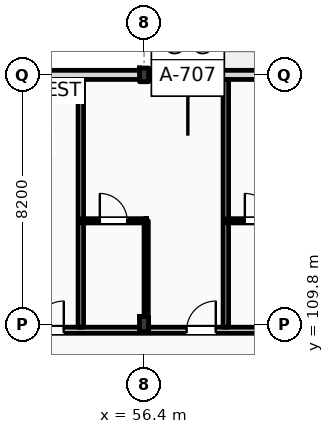
"""IFC4 building model, lengths in metres.
Left out: names, types, materials, properties, quantities, classifications, styles, units other than length and angle.
Written with IfcOpenShell. Run it as: python <this file> out.ifc"""

import sys

from ifc_helpers import new_model, si_unit, direction, frame, frame_2d, origin, origin_2d, place, context, subcontext, project, spatial, rectangle, i_section, extrude, element, fill, save


model = new_model("IFC4")
c1 = context("Model", 3, precision=1e-05, world=origin(), true_north=direction((0.0, 1.0)))
c2 = subcontext(c1, "Body", "Model", "MODEL_VIEW")
j1 = project(units=[si_unit("LENGTHUNIT", "METRE"), si_unit("PLANEANGLEUNIT", "RADIAN")], contexts=[c1])
p1 = place(None, origin())
s1 = spatial("IfcSite", under=j1, at=p1, CompositionType="ELEMENT")
p2 = place(p1, origin())
s2 = spatial("IfcBuilding", under=s1, at=p2, CompositionType="ELEMENT")
p3 = place(p2, frame((0.0, 0.0, 35.4)))
s3 = spatial("IfcBuildingStorey", under=s2, at=p3, CompositionType="ELEMENT", Elevation=35.4)
p4 = place(p3, frame((56.4, 109.8, 0.0), z_axis=(0.0, 0.0, 1.0), x_axis=(1.0, 0.0, 0.0)))
e1 = element("IfcColumn", 1, at=p4, inside=s3, PredefinedType="COLUMN", context=c2, shape_type="SweptSolid", body=[
    extrude(i_section(OverallWidth=0.3, OverallDepth=0.5, WebThickness=0.014, FlangeThickness=0.028, FilletRadius=0.027, at=origin_2d()), origin(), (0.0, 0.0, 1.0), 3.6),
])
p5 = place(p3, frame((56.4, 118.0, 0.0), z_axis=(0.0, 0.0, 1.0), x_axis=(1.0, 0.0, 0.0)))
e2 = element("IfcColumn", 2, at=p5, inside=s3, PredefinedType="COLUMN", context=c2, shape_type="SweptSolid", body=[
    extrude(i_section(OverallWidth=0.3, OverallDepth=0.45, WebThickness=0.014, FlangeThickness=0.026, FilletRadius=0.027, at=origin_2d()), origin(), (0.0, 0.0, 1.0), 3.6),
])
p6 = place(p3, frame((22.5, 118.0, 0.0), z_axis=(0.0, 0.0, 1.0), x_axis=(1.0, 0.0, 0.0)))
e3 = element("IfcWall", 3, at=p6, inside=s3, PredefinedType="STANDARD", context=c2, shape_type="SweptSolid", body=[
    extrude(rectangle(XDim=72.9, YDim=0.3, at=frame_2d((36.45, 0.0))), origin(), (0.0, 0.0, 1.0), 2.92),
])
p7 = place(p6, frame((0.91, 0.0, 0.9)))
e4 = element("IfcOpeningElement", 4, at=p7, cuts=e3, PredefinedType="OPENING", context=c2, shape_type="SweptSolid", body=[
    extrude(rectangle(XDim=0.9, YDim=1.84, at=frame_2d((0.45, 0.92))), frame((0.0, 0.16, 0.0), z_axis=(0.0, -1.0, 0.0), x_axis=(1.0, 0.0, 0.0)), (0.0, 0.0, 1.0), 0.32),
])
p8 = place(p6, frame((6.665, 0.0, 0.0)))
e5 = element("IfcOpeningElement", 5, at=p8, cuts=e3, PredefinedType="OPENING", context=c2, shape_type="SweptSolid", body=[
    extrude(rectangle(XDim=1.2, YDim=2.25, at=frame_2d((0.6, 1.125))), frame((0.0, 0.16, 0.0), z_axis=(0.0, -1.0, 0.0), x_axis=(1.0, 0.0, 0.0)), (0.0, 0.0, 1.0), 0.32),
])
p9 = place(p6, frame((11.355, 0.0, 0.9)))
e6 = element("IfcOpeningElement", 6, at=p9, cuts=e3, PredefinedType="OPENING", context=c2, shape_type="SweptSolid", body=[
    extrude(rectangle(XDim=1.1, YDim=1.5, at=frame_2d((0.55, 0.75))), frame((0.0, 0.16, 0.0), z_axis=(0.0, -1.0, 0.0), x_axis=(1.0, 0.0, 0.0)), (0.0, 0.0, 1.0), 0.32),
])
p10 = place(p6, frame((15.58, 0.0, 0.9)))
e7 = element("IfcOpeningElement", 7, at=p10, cuts=e3, PredefinedType="OPENING", context=c2, shape_type="SweptSolid", body=[
    extrude(rectangle(XDim=1.25, YDim=1.6, at=frame_2d((0.625, 0.8))), frame((0.0, 0.16, 0.0), z_axis=(0.0, -1.0, 0.0), x_axis=(1.0, 0.0, 0.0)), (0.0, 0.0, 1.0), 0.32),
])
p11 = place(p6, frame((21.08, 0.0, 0.0)))
e8 = element("IfcOpeningElement", 8, at=p11, cuts=e3, PredefinedType="OPENING", context=c2, shape_type="SweptSolid", body=[
    extrude(rectangle(XDim=1.2, YDim=2.25, at=frame_2d((0.6, 1.125))), frame((0.0, 0.16, 0.0), z_axis=(0.0, -1.0, 0.0), x_axis=(1.0, 0.0, 0.0)), (0.0, 0.0, 1.0), 0.32),
])
p12 = place(p6, frame((23.54, 0.0, 0.0)))
e9 = element("IfcOpeningElement", 9, at=p12, cuts=e3, PredefinedType="OPENING", context=c2, shape_type="SweptSolid", body=[
    extrude(rectangle(XDim=1.2, YDim=2.25, at=frame_2d((0.6, 1.125))), frame((0.0, 0.16, 0.0), z_axis=(0.0, -1.0, 0.0), x_axis=(1.0, 0.0, 0.0)), (0.0, 0.0, 1.0), 0.32),
])
p13 = place(p6, frame((28.83, 0.0, 0.9)))
e10 = element("IfcOpeningElement", 10, at=p13, cuts=e3, PredefinedType="OPENING", context=c2, shape_type="SweptSolid", body=[
    extrude(rectangle(XDim=1.75, YDim=1.84, at=frame_2d((0.875, 0.92))), frame((0.0, 0.16, 0.0), z_axis=(0.0, -1.0, 0.0), x_axis=(1.0, 0.0, 0.0)), (0.0, 0.0, 1.0), 0.32),
])
p14 = place(p6, frame((34.805, 0.0, 0.9)))
e11 = element("IfcOpeningElement", 11, at=p14, cuts=e3, PredefinedType="OPENING", context=c2, shape_type="SweptSolid", body=[
    extrude(rectangle(XDim=1.35, YDim=1.84, at=frame_2d((0.675, 0.92))), frame((0.0, 0.16, 0.0), z_axis=(0.0, -1.0, 0.0), x_axis=(1.0, 0.0, 0.0)), (0.0, 0.0, 1.0), 0.32),
])
p15 = place(p6, frame((38.105, 0.0, 0.0)))
e12 = element("IfcOpeningElement", 12, at=p15, cuts=e3, PredefinedType="OPENING", context=c2, shape_type="SweptSolid", body=[
    extrude(rectangle(XDim=1.2, YDim=2.25, at=frame_2d((0.6, 1.125))), frame((0.0, 0.16, 0.0), z_axis=(0.0, -1.0, 0.0), x_axis=(1.0, 0.0, 0.0)), (0.0, 0.0, 1.0), 0.32),
])
p16 = place(p6, frame((42.505, 0.0, 0.9)))
e13 = element("IfcOpeningElement", 13, at=p16, cuts=e3, PredefinedType="OPENING", context=c2, shape_type="SweptSolid", body=[
    extrude(rectangle(XDim=2.6, YDim=1.84, at=frame_2d((1.3, 0.92))), frame((0.0, 0.16, 0.0), z_axis=(0.0, -1.0, 0.0), x_axis=(1.0, 0.0, 0.0)), (0.0, 0.0, 1.0), 0.32),
])
p17 = place(p6, frame((46.2, 0.0, 0.9)))
e14 = element("IfcOpeningElement", 14, at=p17, cuts=e3, PredefinedType="OPENING", context=c2, shape_type="SweptSolid", body=[
    extrude(rectangle(XDim=1.8, YDim=1.84, at=frame_2d((0.9, 0.92))), frame((0.0, 0.16, 0.0), z_axis=(0.0, -1.0, 0.0), x_axis=(1.0, 0.0, 0.0)), (0.0, 0.0, 1.0), 0.32),
])
p18 = place(p6, frame((52.565, 0.0, 0.0)))
e15 = element("IfcOpeningElement", 15, at=p18, cuts=e3, PredefinedType="OPENING", context=c2, shape_type="SweptSolid", body=[
    extrude(rectangle(XDim=1.2, YDim=2.25, at=frame_2d((0.6, 1.125))), frame((0.0, 0.16, 0.0), z_axis=(0.0, -1.0, 0.0), x_axis=(1.0, 0.0, 0.0)), (0.0, 0.0, 1.0), 0.32),
])
p19 = place(p6, frame((55.305, 0.0, 0.9)))
e16 = element("IfcOpeningElement", 16, at=p19, cuts=e3, PredefinedType="OPENING", context=c2, shape_type="SweptSolid", body=[
    extrude(rectangle(XDim=1.2, YDim=1.8, at=frame_2d((0.6, 0.9))), frame((0.0, 0.16, 0.0), z_axis=(0.0, -1.0, 0.0), x_axis=(1.0, 0.0, 0.0)), (0.0, 0.0, 1.0), 0.32),
])
p20 = place(p6, frame((60.53, 0.0, 0.9)))
e17 = element("IfcOpeningElement", 17, at=p20, cuts=e3, PredefinedType="OPENING", context=c2, shape_type="SweptSolid", body=[
    extrude(rectangle(XDim=1.35, YDim=1.84, at=frame_2d((0.675, 0.92))), frame((0.0, 0.16, 0.0), z_axis=(0.0, -1.0, 0.0), x_axis=(1.0, 0.0, 0.0)), (0.0, 0.0, 1.0), 0.32),
])
p21 = place(p6, frame((65.955, 0.0, 0.9)))
e18 = element("IfcOpeningElement", 18, at=p21, cuts=e3, PredefinedType="OPENING", context=c2, shape_type="SweptSolid", body=[
    extrude(rectangle(XDim=1.35, YDim=1.84, at=frame_2d((0.675, 0.92))), frame((0.0, 0.16, 0.0), z_axis=(0.0, -1.0, 0.0), x_axis=(1.0, 0.0, 0.0)), (0.0, 0.0, 1.0), 0.32),
])
p22 = place(p6, frame((69.335, 0.0, 0.9)))
e19 = element("IfcOpeningElement", 19, at=p22, cuts=e3, PredefinedType="OPENING", context=c2, shape_type="SweptSolid", body=[
    extrude(rectangle(XDim=1.65, YDim=1.84, at=frame_2d((0.825, 0.92))), frame((0.0, 0.16, 0.0), z_axis=(0.0, -1.0, 0.0), x_axis=(1.0, 0.0, 0.0)), (0.0, 0.0, 1.0), 0.32),
])
p23 = place(p3, frame((10.65, 109.6, 0.0), z_axis=(0.0, 0.0, 1.0), x_axis=(1.0, 0.0, 0.0)))
e20 = element("IfcWall", 20, at=p23, inside=s3, PredefinedType="PARTITIONING", context=c2, shape_type="SweptSolid", body=[
    extrude(rectangle(XDim=84.61, YDim=0.2, at=frame_2d((42.305, 0.0))), origin(), (0.0, 0.0, 1.0), 2.82),
])
p24 = place(p23, frame((12.675, 0.0, 0.0)))
e21 = element("IfcOpeningElement", 21, at=p24, cuts=e20, PredefinedType="OPENING", context=c2, shape_type="SweptSolid", body=[
    extrude(rectangle(XDim=1.02, YDim=2.2, at=frame_2d((0.51, 1.1))), frame((0.0, 0.11, 0.0), z_axis=(0.0, -1.0, 0.0), x_axis=(1.0, 0.0, 0.0)), (0.0, 0.0, 1.0), 0.22),
])
p25 = place(p23, frame((19.62, 0.0, 0.0)))
e22 = element("IfcOpeningElement", 22, at=p25, cuts=e20, PredefinedType="OPENING", context=c2, shape_type="SweptSolid", body=[
    extrude(rectangle(XDim=1.02, YDim=2.2, at=frame_2d((0.51, 1.1))), frame((0.0, 0.11, 0.0), z_axis=(0.0, -1.0, 0.0), x_axis=(1.0, 0.0, 0.0)), (0.0, 0.0, 1.0), 0.22),
])
p26 = place(p23, frame((24.12, 0.0, 0.0)))
e23 = element("IfcOpeningElement", 23, at=p26, cuts=e20, PredefinedType="OPENING", context=c2, shape_type="SweptSolid", body=[
    extrude(rectangle(XDim=1.02, YDim=2.2, at=frame_2d((0.51, 1.1))), frame((0.0, 0.11, 0.0), z_axis=(0.0, -1.0, 0.0), x_axis=(1.0, 0.0, 0.0)), (0.0, 0.0, 1.0), 0.22),
])
p27 = place(p23, frame((26.47, 0.0, 0.0)))
e24 = element("IfcOpeningElement", 24, at=p27, cuts=e20, PredefinedType="OPENING", context=c2, shape_type="SweptSolid", body=[
    extrude(rectangle(XDim=1.02, YDim=2.2, at=frame_2d((0.51, 1.1))), frame((0.0, 0.11, 0.0), z_axis=(0.0, -1.0, 0.0), x_axis=(1.0, 0.0, 0.0)), (0.0, 0.0, 1.0), 0.22),
])
p28 = place(p23, frame((33.15, 0.0, 0.0)))
e25 = element("IfcOpeningElement", 25, at=p28, cuts=e20, PredefinedType="OPENING", context=c2, shape_type="SweptSolid", body=[
    extrude(rectangle(XDim=0.96, YDim=2.2, at=frame_2d((0.48, 1.1))), frame((0.0, 0.11, 0.0), z_axis=(0.0, -1.0, 0.0), x_axis=(1.0, 0.0, 0.0)), (0.0, 0.0, 1.0), 0.22),
])
p29 = place(p23, frame((35.5, 0.0, 0.0)))
e26 = element("IfcOpeningElement", 26, at=p29, cuts=e20, PredefinedType="OPENING", context=c2, shape_type="SweptSolid", body=[
    extrude(rectangle(XDim=0.96, YDim=2.2, at=frame_2d((0.48, 1.1))), frame((0.0, 0.11, 0.0), z_axis=(0.0, -1.0, 0.0), x_axis=(1.0, 0.0, 0.0)), (0.0, 0.0, 1.0), 0.22),
])
p30 = place(p23, frame((42.15, 0.0, 0.0)))
e27 = element("IfcOpeningElement", 27, at=p30, cuts=e20, PredefinedType="OPENING", context=c2, shape_type="SweptSolid", body=[
    extrude(rectangle(XDim=0.96, YDim=2.2, at=frame_2d((0.48, 1.1))), frame((0.0, 0.11, 0.0), z_axis=(0.0, -1.0, 0.0), x_axis=(1.0, 0.0, 0.0)), (0.0, 0.0, 1.0), 0.22),
])
p31 = place(p23, frame((47.15, 0.0, 0.0)))
e28 = element("IfcOpeningElement", 28, at=p31, cuts=e20, PredefinedType="OPENING", context=c2, shape_type="SweptSolid", body=[
    extrude(rectangle(XDim=0.96, YDim=2.2, at=frame_2d((0.48, 1.1))), frame((0.0, 0.11, 0.0), z_axis=(0.0, -1.0, 0.0), x_axis=(1.0, 0.0, 0.0)), (0.0, 0.0, 1.0), 0.22),
])
p32 = place(p23, frame((51.15, 0.0, 0.0)))
e29 = element("IfcOpeningElement", 29, at=p32, cuts=e20, PredefinedType="OPENING", context=c2, shape_type="SweptSolid", body=[
    extrude(rectangle(XDim=0.96, YDim=2.2, at=frame_2d((0.48, 1.1))), frame((0.0, 0.11, 0.0), z_axis=(0.0, -1.0, 0.0), x_axis=(1.0, 0.0, 0.0)), (0.0, 0.0, 1.0), 0.22),
])
p33 = place(p23, frame((55.65, 0.0, 0.0)))
e30 = element("IfcOpeningElement", 30, at=p33, cuts=e20, PredefinedType="OPENING", context=c2, shape_type="SweptSolid", body=[
    extrude(rectangle(XDim=0.96, YDim=2.2, at=frame_2d((0.48, 1.1))), frame((0.0, 0.11, 0.0), z_axis=(0.0, -1.0, 0.0), x_axis=(1.0, 0.0, 0.0)), (0.0, 0.0, 1.0), 0.22),
])
p34 = place(p23, frame((58.0, 0.0, 0.0)))
e31 = element("IfcOpeningElement", 31, at=p34, cuts=e20, PredefinedType="OPENING", context=c2, shape_type="SweptSolid", body=[
    extrude(rectangle(XDim=0.96, YDim=2.2, at=frame_2d((0.48, 1.1))), frame((0.0, 0.11, 0.0), z_axis=(0.0, -1.0, 0.0), x_axis=(1.0, 0.0, 0.0)), (0.0, 0.0, 1.0), 0.22),
])
p35 = place(p23, frame((64.65, 0.0, 0.0)))
e32 = element("IfcOpeningElement", 32, at=p35, cuts=e20, PredefinedType="OPENING", context=c2, shape_type="SweptSolid", body=[
    extrude(rectangle(XDim=0.96, YDim=2.2, at=frame_2d((0.48, 1.1))), frame((0.0, 0.11, 0.0), z_axis=(0.0, -1.0, 0.0), x_axis=(1.0, 0.0, 0.0)), (0.0, 0.0, 1.0), 0.22),
])
p36 = place(p23, frame((66.75, 0.0, 0.0)))
e33 = element("IfcOpeningElement", 33, at=p36, cuts=e20, PredefinedType="OPENING", context=c2, shape_type="SweptSolid", body=[
    extrude(rectangle(XDim=0.96, YDim=2.2, at=frame_2d((0.48, 1.1))), frame((0.0, 0.11, 0.0), z_axis=(0.0, -1.0, 0.0), x_axis=(1.0, 0.0, 0.0)), (0.0, 0.0, 1.0), 0.22),
])
p37 = place(p23, frame((73.65, 0.0, 0.0)))
e34 = element("IfcOpeningElement", 34, at=p37, cuts=e20, PredefinedType="OPENING", context=c2, shape_type="SweptSolid", body=[
    extrude(rectangle(XDim=0.96, YDim=2.2, at=frame_2d((0.48, 1.1))), frame((0.0, 0.11, 0.0), z_axis=(0.0, -1.0, 0.0), x_axis=(1.0, 0.0, 0.0)), (0.0, 0.0, 1.0), 0.22),
])
p38 = place(p23, frame((78.4, 0.0, 0.0)))
e35 = element("IfcOpeningElement", 35, at=p38, cuts=e20, PredefinedType="OPENING", context=c2, shape_type="SweptSolid", body=[
    extrude(rectangle(XDim=0.96, YDim=2.2, at=frame_2d((0.48, 1.1))), frame((0.0, 0.11, 0.0), z_axis=(0.0, -1.0, 0.0), x_axis=(1.0, 0.0, 0.0)), (0.0, 0.0, 1.0), 0.22),
])
p39 = place(p23, frame((80.455, 0.0, 0.0)))
e36 = element("IfcOpeningElement", 36, at=p39, cuts=e20, PredefinedType="OPENING", context=c2, shape_type="SweptSolid", body=[
    extrude(rectangle(XDim=0.96, YDim=2.2, at=frame_2d((0.48, 1.1))), frame((0.0, 0.11, 0.0), z_axis=(0.0, -1.0, 0.0), x_axis=(1.0, 0.0, 0.0)), (0.0, 0.0, 1.0), 0.22),
])
p40 = place(p23, frame((2.716, 0.0, 0.0)))
e37 = element("IfcOpeningElement", 37, at=p40, cuts=e20, PredefinedType="OPENING", context=c2, shape_type="SweptSolid", body=[
    extrude(rectangle(XDim=1.35, YDim=2.25, at=frame_2d((0.675, 1.125))), frame((0.0, 0.11, 0.0), z_axis=(0.0, -1.0, 0.0), x_axis=(1.0, 0.0, 0.0)), (0.0, 0.0, 1.0), 0.22),
])
p41 = place(p23, frame((6.65, 0.0, 0.0)))
e38 = element("IfcOpeningElement", 38, at=p41, cuts=e20, PredefinedType="OPENING", context=c2, shape_type="SweptSolid", body=[
    extrude(rectangle(XDim=1.35, YDim=2.25, at=frame_2d((0.675, 1.125))), frame((0.0, 0.11, 0.0), z_axis=(0.0, -1.0, 0.0), x_axis=(1.0, 0.0, 0.0)), (0.0, 0.0, 1.0), 0.22),
])
p42 = place(p23, frame((10.583, 0.0, 0.0)))
e39 = element("IfcOpeningElement", 39, at=p42, cuts=e20, PredefinedType="OPENING", context=c2, shape_type="SweptSolid", body=[
    extrude(rectangle(XDim=1.35, YDim=2.25, at=frame_2d((0.675, 1.125))), frame((0.0, 0.11, 0.0), z_axis=(0.0, -1.0, 0.0), x_axis=(1.0, 0.0, 0.0)), (0.0, 0.0, 1.0), 0.22),
])
p43 = place(p3, frame((54.32, 109.7, 0.0), z_axis=(0.0, 0.0, 1.0), x_axis=(0.0, 1.0, 0.0)))
e40 = element("IfcWall", 40, at=p43, inside=s3, PredefinedType="PARTITIONING", context=c2, shape_type="SweptSolid", body=[
    extrude(rectangle(XDim=8.15, YDim=0.18, at=frame_2d((4.075, 0.0))), origin(), (0.0, 0.0, 1.0), 3.38),
])
p44 = place(p3, frame((59.09, 109.7, 0.0), z_axis=(0.0, 0.0, 1.0), x_axis=(0.0, 1.0, 0.0)))
e41 = element("IfcWall", 41, at=p44, inside=s3, PredefinedType="PARTITIONING", context=c2, shape_type="SweptSolid", body=[
    extrude(rectangle(XDim=8.15, YDim=0.18, at=frame_2d((4.075, 0.0))), origin(), (0.0, 0.0, 1.0), 3.07),
])
p45 = place(p3, frame((56.47, 109.7, 0.0), z_axis=(0.0, 0.0, 1.0), x_axis=(0.0, 1.0, 0.0)))
e42 = element("IfcWall", 42, at=p45, inside=s3, PredefinedType="PARTITIONING", context=c2, shape_type="SweptSolid", body=[
    extrude(rectangle(XDim=3.5, YDim=0.14, at=frame_2d((1.75, 0.0))), origin(), (0.0, 0.0, 1.0), 3.01),
])
p46 = place(p3, frame((54.32, 113.2, 0.0), z_axis=(0.0, 0.0, 1.0), x_axis=(1.0, 0.0, 0.0)))
e43 = element("IfcWall", 43, at=p46, inside=s3, PredefinedType="PARTITIONING", context=c2, shape_type="SweptSolid", body=[
    extrude(rectangle(XDim=2.15, YDim=0.14, at=frame_2d((1.075, 0.0))), origin(), (0.0, 0.0, 1.0), 3.38),
])
p47 = place(p46, frame((0.625, 0.0, 0.0)))
e44 = element("IfcOpeningElement", 44, at=p47, cuts=e43, PredefinedType="OPENING", context=c2, shape_type="SweptSolid", body=[
    extrude(rectangle(XDim=0.9, YDim=2.1, at=frame_2d((0.45, 1.05))), frame((0.0, 0.08, 0.0), z_axis=(0.0, -1.0, 0.0), x_axis=(1.0, 0.0, 0.0)), (0.0, 0.0, 1.0), 0.16),
])
p48 = place(p3, frame((59.09, 113.2, 0.0), z_axis=(0.0, 0.0, 1.0), x_axis=(1.0, 0.0, 0.0)))
e45 = element("IfcWall", 45, at=p48, inside=s3, PredefinedType="PARTITIONING", context=c2, shape_type="SweptSolid", body=[
    extrude(rectangle(XDim=2.15, YDim=0.14, at=frame_2d((1.075, 0.0))), origin(), (0.0, 0.0, 1.0), 3.38),
])
p49 = place(p48, frame((0.625, 0.0, 0.0)))
e46 = element("IfcOpeningElement", 46, at=p49, cuts=e45, PredefinedType="OPENING", context=c2, shape_type="SweptSolid", body=[
    extrude(rectangle(XDim=0.9, YDim=2.1, at=frame_2d((0.45, 1.05))), frame((0.0, 0.08, 0.0), z_axis=(0.0, -1.0, 0.0), x_axis=(1.0, 0.0, 0.0)), (0.0, 0.0, 1.0), 0.16),
])
p50 = place(p14, origin())
e47 = element("IfcWindow", 47, at=p50, inside=s3, PartitioningType="DOUBLE_PANEL_VERTICAL", PredefinedType="WINDOW", context=c2, shape_type="SweptSolid", body=[
    extrude(rectangle(XDim=1.35, YDim=1.84, at=frame_2d((0.675, 0.92))), frame((0.0, 0.03, 0.0), z_axis=(0.0, -1.0, 0.0), x_axis=(1.0, 0.0, 0.0)), (0.0, 0.0, 1.0), 0.06),
])
fill(e11, e47)
p51 = place(p30, origin())
e48 = element("IfcDoor", 48, at=p51, inside=s3, OperationType="SINGLE_SWING_RIGHT", PredefinedType="DOOR", context=c2, shape_type="SweptSolid", body=[
    extrude(rectangle(XDim=0.96, YDim=2.2, at=frame_2d((0.48, 1.1))), frame((0.0, 0.025, 0.0), z_axis=(0.0, -1.0, 0.0), x_axis=(1.0, 0.0, 0.0)), (0.0, 0.0, 1.0), 0.05),
])
fill(e27, e48)
p52 = place(p31, origin())
e49 = element("IfcDoor", 49, at=p52, inside=s3, OperationType="SINGLE_SWING_RIGHT", PredefinedType="DOOR", context=c2, shape_type="SweptSolid", body=[
    extrude(rectangle(XDim=0.96, YDim=2.2, at=frame_2d((0.48, 1.1))), frame((0.0, 0.025, 0.0), z_axis=(0.0, -1.0, 0.0), x_axis=(1.0, 0.0, 0.0)), (0.0, 0.0, 1.0), 0.05),
])
fill(e28, e49)
p53 = place(p47, origin())
e50 = element("IfcDoor", 50, at=p53, inside=s3, OperationType="SINGLE_SWING_LEFT", PredefinedType="DOOR", context=c2, shape_type="SweptSolid", body=[
    extrude(rectangle(XDim=0.9, YDim=2.1, at=frame_2d((0.45, 1.05))), frame((0.0, 0.025, 0.0), z_axis=(0.0, -1.0, 0.0), x_axis=(1.0, 0.0, 0.0)), (0.0, 0.0, 1.0), 0.05),
])
fill(e44, e50)
p54 = place(p49, origin())
e51 = element("IfcDoor", 51, at=p54, inside=s3, OperationType="SINGLE_SWING_LEFT", PredefinedType="DOOR", context=c2, shape_type="SweptSolid", body=[
    extrude(rectangle(XDim=0.9, YDim=2.1, at=frame_2d((0.45, 1.05))), frame((0.0, 0.025, 0.0), z_axis=(0.0, -1.0, 0.0), x_axis=(1.0, 0.0, 0.0)), (0.0, 0.0, 1.0), 0.05),
])
fill(e46, e51)
save(model, sys.argv[1])
